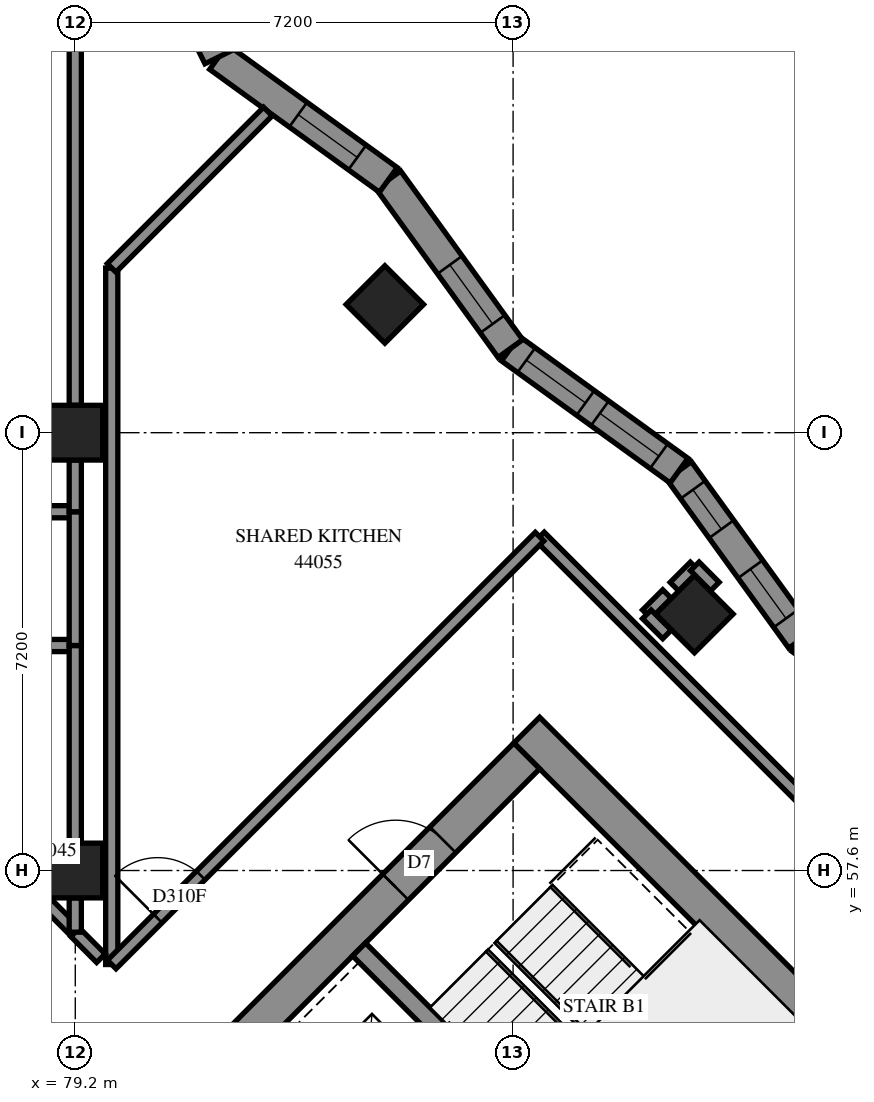
"""IFC4 building model, lengths in metres.
Left out: names, types, materials, properties, quantities, classifications, styles, units other than length and angle.
Written with IfcOpenShell. Run it as: python <this file> out.ifc"""

import sys

from ifc_helpers import new_model, si_unit, direction, frame, frame_2d, origin, origin_2d, place, context, subcontext, project, spatial, polyline, rectangle, outline, extrude, element, fill, save


model = new_model("IFC4")
c1 = context("Model", 3, precision=1e-05, world=origin(), true_north=direction((0.0, 1.0)))
c2 = subcontext(c1, "Body", "Model", "MODEL_VIEW")
j1 = project(units=[si_unit("LENGTHUNIT", "METRE"), si_unit("PLANEANGLEUNIT", "RADIAN")], contexts=[c1])
p1 = place(None, origin())
s1 = spatial("IfcSite", under=j1, at=p1, CompositionType="ELEMENT")
p2 = place(p1, origin())
s2 = spatial("IfcBuilding", under=s1, at=p2, CompositionType="ELEMENT")
p3 = place(p2, frame((0.0, 0.0, 162.6)))
s3 = spatial("IfcBuildingStorey", under=s2, at=p3, CompositionType="ELEMENT", Elevation=162.6)
for number, where, z_axis, x_axis in (
    (1, (79.2, 57.6, 0.0), (0.0, 0.0, 1.0), (1.0, 0.0, 0.0)),
    (2, (79.2, 64.8, 0.0), (0.0, 0.0, 1.0), (1.0, 0.0, 0.0)),
    (3, (84.291, 66.909, 0.0), (0.0, 0.0, 1.0), (0.707, -0.707, 0.0)),
    (4, (89.382, 61.818, 0.0), (0.0, 0.0, 1.0), (0.707, -0.707, 0.0)),
):
    element("IfcColumn", number, at=place(p3, frame(where, z_axis=z_axis, x_axis=x_axis)), inside=s3, PredefinedType="COLUMN", context=c2, shape_type="SweptSolid", body=[
        extrude(rectangle(XDim=0.9, YDim=0.9, at=origin_2d()), origin(), (0.0, 0.0, 1.0), 3.1),
    ])
p4 = place(p3, frame((86.625, 59.908, -0.3), z_axis=(0.0, 0.0, 1.0), x_axis=(0.7071067812, -0.7071067812, 0.0)))
e5 = element("IfcWall", 5, at=p4, inside=s3, PredefinedType="SHEAR", context=c2, shape_type="SweptSolid", body=[
    extrude(rectangle(XDim=15.6, YDim=0.6, at=frame_2d((7.8, 0.0))), origin(), (0.0, 0.0, 1.0), 2.7),
])
p5 = place(p4, frame((10.6, 0.0, 0.3)))
e6 = element("IfcOpeningElement", 6, at=p5, cuts=e5, PredefinedType="OPENING", context=c2, shape_type="SweptSolid", body=[
    extrude(rectangle(XDim=0.8, YDim=2.1, at=frame_2d((0.4, 1.05))), frame((0.0, 0.31, 0.0), z_axis=(0.0, -1.0, 0.0), x_axis=(1.0, 0.0, 0.0)), (0.0, 0.0, 1.0), 0.62),
])
p6 = place(p3, frame((76.442, 49.302, -0.3), z_axis=(0.0, 0.0, 1.0), x_axis=(0.7071067812, 0.7071067812, 0.0)))
e7 = element("IfcWall", 7, at=p6, inside=s3, PredefinedType="SHEAR", context=c2, shape_type="SweptSolid", body=[
    extrude(rectangle(XDim=14.4, YDim=0.6, at=frame_2d((7.2, 0.0))), origin(), (0.0, 0.0, 1.0), 2.7),
])
p7 = place(p6, frame((4.55, 0.0, 0.3)))
e8 = element("IfcOpeningElement", 8, at=p7, cuts=e7, PredefinedType="OPENING", context=c2, shape_type="SweptSolid", body=[
    extrude(rectangle(XDim=1.1, YDim=2.1, at=frame_2d((0.55, 1.05))), frame((0.0, 0.31, 0.0), z_axis=(0.0, -1.0, 0.0), x_axis=(1.0, 0.0, 0.0)), (0.0, 0.0, 1.0), 0.62),
])
p8 = place(p6, frame((11.35, 0.0, 0.3)))
e9 = element("IfcOpeningElement", 9, at=p8, cuts=e7, PredefinedType="OPENING", context=c2, shape_type="SweptSolid", body=[
    extrude(rectangle(XDim=1.1, YDim=2.1, at=frame_2d((0.55, 1.05))), frame((0.0, 0.31, 0.0), z_axis=(0.0, -1.0, 0.0), x_axis=(1.0, 0.0, 0.0)), (0.0, 0.0, 1.0), 0.62),
])
p9 = place(p3, frame((83.867, 56.302, 0.0), z_axis=(0.0, 0.0, 1.0), x_axis=(0.7071137256, -0.7070998367, 0.0)))
e10 = element("IfcWall", 10, at=p9, inside=s3, PredefinedType="SOLIDWALL", context=c2, shape_type="SweptSolid", body=[
    extrude(rectangle(XDim=7.2, YDim=0.3, at=frame_2d((3.6, 0.0))), origin(), (0.0, 0.0, 1.0), 3.1),
])
p10 = place(p3, frame((93.91, 59.395, 0.0), z_axis=(0.0, 0.0, 1.0), x_axis=(-0.8101104885, 0.5862772351, 0.0)))
e11 = element("IfcWall", 11, at=p10, inside=s3, PredefinedType="SOLIDWALL", context=c2, shape_type="SweptSolid", body=[
    extrude(outline(polyline([(-0.04, -0.25), (3.384, -0.25), (3.464, 0.25), (0.04, 0.25), (-0.04, -0.25)])), origin(), (0.0, 0.0, 1.0), 3.1),
])
p11 = place(p10, frame((1.678, 0.0, 0.45)))
e12 = element("IfcOpeningElement", 12, at=p11, cuts=e11, PredefinedType="OPENING", context=c2, shape_type="SweptSolid", body=[
    extrude(rectangle(XDim=1.2, YDim=2.5, at=frame_2d((0.6, 1.25))), frame((0.0, 0.26, 0.0), z_axis=(0.0, -1.0, 0.0), x_axis=(1.0, 0.0, 0.0)), (0.0, 0.0, 1.0), 0.52),
])
p12 = place(p3, frame((91.137, 61.402, 0.0), z_axis=(0.0, 0.0, 1.0), x_axis=(-0.5862772351, 0.8101104885, 0.0)))
e13 = element("IfcWall", 13, at=p12, inside=s3, PredefinedType="SOLIDWALL", context=c2, shape_type="SweptSolid", body=[
    extrude(outline(polyline([(0.04, -0.25), (3.464, -0.25), (3.384, 0.25), (-0.04, 0.25), (0.04, -0.25)])), origin(), (0.0, 0.0, 1.0), 3.1),
])
p13 = place(p12, frame((0.423, 0.0, 0.45)))
e14 = element("IfcOpeningElement", 14, at=p13, cuts=e13, PredefinedType="OPENING", context=c2, shape_type="SweptSolid", body=[
    extrude(rectangle(XDim=1.0, YDim=2.5, at=frame_2d((0.5, 1.25))), frame((0.0, 0.26, 0.0), z_axis=(0.0, -1.0, 0.0), x_axis=(1.0, 0.0, 0.0)), (0.0, 0.0, 1.0), 0.52),
])
p14 = place(p12, frame((2.236, 0.0, 0.45)))
e15 = element("IfcOpeningElement", 15, at=p14, cuts=e13, PredefinedType="OPENING", context=c2, shape_type="SweptSolid", body=[
    extrude(rectangle(XDim=0.8, YDim=2.5, at=frame_2d((0.4, 1.25))), frame((0.0, 0.26, 0.0), z_axis=(0.0, -1.0, 0.0), x_axis=(1.0, 0.0, 0.0)), (0.0, 0.0, 1.0), 0.52),
])
p15 = place(p3, frame((89.129, 64.176, 0.0), z_axis=(0.0, 0.0, 1.0), x_axis=(-0.8101205268, 0.586263364, 0.0)))
e16 = element("IfcWall", 16, at=p15, inside=s3, PredefinedType="SOLIDWALL", context=c2, shape_type="SweptSolid", body=[
    extrude(outline(polyline([(-0.04, -0.25), (3.384, -0.25), (3.464, 0.25), (0.04, 0.25), (-0.04, -0.25)])), origin(), (0.0, 0.0, 1.0), 3.1),
])
p16 = place(p15, frame((0.408, 0.0, 0.45)))
e17 = element("IfcOpeningElement", 17, at=p16, cuts=e16, PredefinedType="OPENING", context=c2, shape_type="SweptSolid", body=[
    extrude(rectangle(XDim=1.2, YDim=2.5, at=frame_2d((0.6, 1.25))), frame((0.0, 0.26, 0.0), z_axis=(0.0, -1.0, 0.0), x_axis=(1.0, 0.0, 0.0)), (0.0, 0.0, 1.0), 0.52),
])
p17 = place(p15, frame((1.9, 0.0, 0.45)))
e18 = element("IfcOpeningElement", 18, at=p17, cuts=e16, PredefinedType="OPENING", context=c2, shape_type="SweptSolid", body=[
    extrude(rectangle(XDim=1.2, YDim=2.5, at=frame_2d((0.6, 1.25))), frame((0.0, 0.26, 0.0), z_axis=(0.0, -1.0, 0.0), x_axis=(1.0, 0.0, 0.0)), (0.0, 0.0, 1.0), 0.52),
])
p18 = place(p3, frame((86.355, 66.184, 0.0), z_axis=(0.0, 0.0, 1.0), x_axis=(-0.5862441964, 0.8101343976, 0.0)))
e19 = element("IfcWall", 19, at=p18, inside=s3, PredefinedType="SOLIDWALL", context=c2, shape_type="SweptSolid", body=[
    extrude(outline(polyline([(0.04, -0.25), (3.464, -0.25), (3.384, 0.25), (-0.04, 0.25), (0.04, -0.25)])), origin(), (0.0, 0.0, 1.0), 3.1),
])
p19 = place(p18, frame((0.499, 0.0, 0.45)))
e20 = element("IfcOpeningElement", 20, at=p19, cuts=e19, PredefinedType="OPENING", context=c2, shape_type="SweptSolid", body=[
    extrude(rectangle(XDim=1.2, YDim=2.5, at=frame_2d((0.6, 1.25))), frame((0.0, 0.26, 0.0), z_axis=(0.0, -1.0, 0.0), x_axis=(1.0, 0.0, 0.0)), (0.0, 0.0, 1.0), 0.52),
])
p20 = place(p3, frame((84.348, 68.957, 0.0), z_axis=(0.0, 0.0, 1.0), x_axis=(-0.8101255807, 0.5862563803, 0.0)))
e21 = element("IfcWall", 21, at=p20, inside=s3, PredefinedType="SOLIDWALL", context=c2, shape_type="SweptSolid", body=[
    extrude(outline(polyline([(-0.04, -0.25), (3.384, -0.25), (3.507, 0.25), (0.04, 0.25), (-0.04, -0.25)])), origin(), (0.0, 0.0, 1.0), 3.1),
])
p21 = place(p20, frame((0.63, 0.0, 0.45)))
e22 = element("IfcOpeningElement", 22, at=p21, cuts=e21, PredefinedType="OPENING", context=c2, shape_type="SweptSolid", body=[
    extrude(rectangle(XDim=1.2, YDim=2.5, at=frame_2d((0.6, 1.25))), frame((0.0, 0.26, 0.0), z_axis=(0.0, -1.0, 0.0), x_axis=(1.0, 0.0, 0.0)), (0.0, 0.0, 1.0), 0.52),
])
p22 = place(p3, frame((81.557, 70.978, 0.0), z_axis=(0.0, 0.0, 1.0), x_axis=(-0.4436419496, 0.8962041177, 0.0)))
e23 = element("IfcWall", 23, at=p22, inside=s3, PredefinedType="SOLIDWALL", context=c2, shape_type="SweptSolid", body=[
    extrude(outline(polyline([(0.062, -0.25), (3.63, -0.25), (3.208, 0.25), (-0.062, 0.25), (0.062, -0.25)])), origin(), (0.0, 0.0, 1.0), 3.1),
])
p23 = place(p22, frame((0.761, 0.0, 0.45)))
e24 = element("IfcOpeningElement", 24, at=p23, cuts=e23, PredefinedType="OPENING", context=c2, shape_type="SweptSolid", body=[
    extrude(rectangle(XDim=1.2, YDim=2.5, at=frame_2d((0.6, 1.25))), frame((0.0, 0.26, 0.0), z_axis=(0.0, -1.0, 0.0), x_axis=(1.0, 0.0, 0.0)), (0.0, 0.0, 1.0), 0.52),
])
p24 = place(p3, frame((86.841, 63.093, 0.0), z_axis=(0.0, 0.0, 1.0), x_axis=(0.7071067812, -0.7071067812, 0.0)))
e25 = element("IfcWall", 25, at=p24, inside=s3, PredefinedType="PARTITIONING", context=c2, shape_type="SweptSolid", body=[
    extrude(rectangle(XDim=12.239, YDim=0.2, at=frame_2d((6.119, 0.0))), origin(), (0.0, 0.0, 1.0), 3.1),
])
p25 = place(p3, frame((79.8, 56.054, 0.0), z_axis=(0.0, 0.0, 1.0), x_axis=(0.0, 1.0, 0.0)))
e26 = element("IfcWall", 26, at=p25, inside=s3, PredefinedType="PARTITIONING", context=c2, shape_type="SweptSolid", body=[
    extrude(rectangle(XDim=11.454, YDim=0.2, at=frame_2d((5.727, 0.0))), origin(), (0.0, 0.0, 1.0), 3.1),
])
p26 = place(p3, frame((79.799, 56.055, 0.0), z_axis=(0.0, 0.0, 1.0), x_axis=(0.7071067812, 0.7071067812, 0.0)))
e27 = element("IfcWall", 27, at=p26, inside=s3, PredefinedType="PARTITIONING", context=c2, shape_type="SweptSolid", body=[
    extrude(rectangle(XDim=9.95, YDim=0.2, at=frame_2d((4.975, 0.0))), origin(), (0.0, 0.0, 1.0), 3.1),
])
p27 = place(p26, frame((1.071, 0.0, 0.0)))
e28 = element("IfcOpeningElement", 28, at=p27, cuts=e27, PredefinedType="OPENING", context=c2, shape_type="SweptSolid", body=[
    extrude(rectangle(XDim=1.0, YDim=2.1, at=frame_2d((0.5, 1.05))), frame((0.0, 0.11, 0.0), z_axis=(0.0, -1.0, 0.0), x_axis=(1.0, 0.0, 0.0)), (0.0, 0.0, 1.0), 0.22),
])
p28 = place(p3, frame((79.2, 65.25, 0.0), z_axis=(0.0, 0.0, 1.0), x_axis=(0.0, 1.0, 0.0)))
e29 = element("IfcWall", 29, at=p28, inside=s3, PredefinedType="PARTITIONING", context=c2, shape_type="SweptSolid", body=[
    extrude(rectangle(XDim=6.3, YDim=0.2, at=frame_2d((3.15, 0.0))), origin(), (0.0, 0.0, 1.0), 3.1),
])
p29 = place(p3, frame((74.903, 60.889, 0.0), z_axis=(0.0, 0.0, 1.0), x_axis=(0.7071067812, -0.7071067812, 0.0)))
e30 = element("IfcWall", 30, at=p29, inside=s3, PredefinedType="PARTITIONING", context=c2, shape_type="SweptSolid", body=[
    extrude(rectangle(XDim=6.081, YDim=0.2, at=frame_2d((3.041, 0.0))), origin(), (0.0, 0.0, 1.0), 3.1),
])
p30 = place(p3, frame((74.488, 61.3, 0.0), z_axis=(0.0, 0.0, 1.0), x_axis=(1.0, 0.0, 0.0)))
e31 = element("IfcWall", 31, at=p30, inside=s3, PredefinedType="PARTITIONING", context=c2, shape_type="SweptSolid", body=[
    extrude(rectangle(XDim=4.712, YDim=0.2, at=frame_2d((2.356, 0.0))), origin(), (0.0, 0.0, 1.0), 3.1),
])
p31 = place(p30, frame((1.037, 0.0, 0.0)))
e32 = element("IfcOpeningElement", 32, at=p31, cuts=e31, PredefinedType="OPENING", context=c2, shape_type="SweptSolid", body=[
    extrude(rectangle(XDim=1.0, YDim=2.1, at=frame_2d((0.5, 1.05))), frame((0.0, 0.11, 0.0), z_axis=(0.0, -1.0, 0.0), x_axis=(1.0, 0.0, 0.0)), (0.0, 0.0, 1.0), 0.22),
])
p32 = place(p3, frame((74.702, 63.5, 0.0), z_axis=(0.0, 0.0, 1.0), x_axis=(1.0, 0.0, 0.0)))
e33 = element("IfcWall", 33, at=p32, inside=s3, PredefinedType="PARTITIONING", context=c2, shape_type="SweptSolid", body=[
    extrude(rectangle(XDim=4.498, YDim=0.2, at=frame_2d((2.249, 0.0))), origin(), (0.0, 0.0, 1.0), 3.1),
])
p33 = place(p32, frame((3.046, 0.0, 0.0)))
e34 = element("IfcOpeningElement", 34, at=p33, cuts=e33, PredefinedType="OPENING", context=c2, shape_type="SweptSolid", body=[
    extrude(rectangle(XDim=0.9, YDim=2.1, at=frame_2d((0.45, 1.05))), frame((0.0, 0.11, 0.0), z_axis=(0.0, -1.0, 0.0), x_axis=(1.0, 0.0, 0.0)), (0.0, 0.0, 1.0), 0.22),
])
p34 = place(p3, frame((79.798, 67.51, 0.0), z_axis=(0.0, 0.0, 1.0), x_axis=(0.7068316745, 0.7073817809, 0.0)))
e35 = element("IfcWall", 35, at=p34, inside=s3, PredefinedType="PARTITIONING", context=c2, shape_type="SweptSolid", body=[
    extrude(rectangle(XDim=3.636, YDim=0.2, at=frame_2d((1.818, 0.0))), origin(), (0.0, 0.0, 1.0), 3.1),
])
p35 = place(p3, frame((79.2, 58.05, 0.0), z_axis=(0.0, 0.0, 1.0), x_axis=(0.0, 1.0, 0.0)))
e36 = element("IfcWall", 36, at=p35, inside=s3, PredefinedType="PARTITIONING", context=c2, shape_type="SweptSolid", body=[
    extrude(rectangle(XDim=3.25, YDim=0.2, at=frame_2d((1.625, 0.0))), origin(), (0.0, 0.0, 1.0), 3.1),
])
p36 = place(p3, frame((79.2, 61.3, 0.0), z_axis=(0.0, 0.0, 1.0), x_axis=(0.0, 1.0, 0.0)))
e37 = element("IfcWall", 37, at=p36, inside=s3, PredefinedType="PARTITIONING", context=c2, shape_type="SweptSolid", body=[
    extrude(rectangle(XDim=2.2, YDim=0.2, at=frame_2d((1.1, 0.0))), origin(), (0.0, 0.0, 1.0), 3.1),
])
p37 = place(p3, frame((79.2, 63.5, 0.0), z_axis=(0.0, 0.0, 1.0), x_axis=(0.0, 1.0, 0.0)))
e38 = element("IfcWall", 38, at=p37, inside=s3, PredefinedType="PARTITIONING", context=c2, shape_type="SweptSolid", body=[
    extrude(rectangle(XDim=0.85, YDim=0.2, at=frame_2d((0.425, 0.0))), origin(), (0.0, 0.0, 1.0), 3.1),
])
p38 = place(p3, frame((79.198, 56.584, 0.0), z_axis=(0.0, 0.0, 1.0), x_axis=(0.7054410477, -0.7087685999, 0.0)))
e39 = element("IfcWall", 39, at=p38, inside=s3, PredefinedType="PARTITIONING", context=c2, shape_type="SweptSolid", body=[
    extrude(rectangle(XDim=0.601, YDim=0.2, at=frame_2d((0.3, 0.0))), origin(), (0.0, 0.0, 1.0), 3.1),
])
p39 = place(p3, frame((79.2, 56.586, 0.0), z_axis=(0.0, 0.0, 1.0), x_axis=(0.0, 1.0, 0.0)))
e40 = element("IfcWall", 40, at=p39, inside=s3, PredefinedType="PARTITIONING", context=c2, shape_type="SweptSolid", body=[
    extrude(rectangle(XDim=0.564, YDim=0.2, at=frame_2d((0.282, 0.0))), origin(), (0.0, 0.0, 1.0), 3.1),
])
for number, where, z_axis, x_axis in (
    (41, (88.6, 61.814, 0.0), (0.0, 0.0, 1.0), (0.707, 0.707, 0.0)),
    (42, (89.054, 62.268, 0.0), (0.0, 0.0, 1.0), (0.707, 0.707, 0.0)),
):
    element("IfcWall", number, at=place(p3, frame(where, z_axis=z_axis, x_axis=x_axis)), inside=s3, PredefinedType="PARTITIONING", context=c2, shape_type="SweptSolid", body=[
        extrude(rectangle(XDim=0.469, YDim=0.2, at=frame_2d((0.235, 0.0))), origin(), (0.0, 0.0, 1.0), 3.1),
    ])
for number, where, z_axis, x_axis in (
    (43, (88.599, 61.813, 0.0), (0.0, 0.0, 1.0), (0.709, -0.705, 0.0)),
    (44, (89.388, 62.602, 0.0), (0.0, 0.0, 1.0), (0.705, -0.709, 0.0)),
):
    element("IfcWall", number, at=place(p3, frame(where, z_axis=z_axis, x_axis=x_axis)), inside=s3, PredefinedType="PARTITIONING", context=c2, shape_type="SweptSolid", body=[
        extrude(rectangle(XDim=0.468, YDim=0.2, at=frame_2d((0.234, 0.0))), origin(), (0.0, 0.0, 1.0), 3.1),
    ])
p40 = place(p16, origin())
e45 = element("IfcWindow", 45, at=p40, inside=s3, PartitioningType="SINGLE_PANEL", PredefinedType="WINDOW", context=c2, shape_type="SweptSolid", body=[
    extrude(rectangle(XDim=1.2, YDim=2.5, at=frame_2d((0.6, 1.25))), frame((0.0, 0.18, 0.0), z_axis=(0.0, -1.0, 0.0), x_axis=(1.0, 0.0, 0.0)), (0.0, 0.0, 1.0), 0.06),
])
fill(e17, e45)
p41 = place(p17, origin())
e46 = element("IfcWindow", 46, at=p41, inside=s3, PartitioningType="SINGLE_PANEL", PredefinedType="WINDOW", context=c2, shape_type="SweptSolid", body=[
    extrude(rectangle(XDim=1.2, YDim=2.5, at=frame_2d((0.6, 1.25))), frame((0.0, 0.18, 0.0), z_axis=(0.0, -1.0, 0.0), x_axis=(1.0, 0.0, 0.0)), (0.0, 0.0, 1.0), 0.06),
])
fill(e18, e46)
p42 = place(p19, origin())
e47 = element("IfcWindow", 47, at=p42, inside=s3, PartitioningType="SINGLE_PANEL", PredefinedType="WINDOW", context=c2, shape_type="SweptSolid", body=[
    extrude(rectangle(XDim=1.2, YDim=2.5, at=frame_2d((0.6, 1.25))), frame((0.0, 0.18, 0.0), z_axis=(0.0, -1.0, 0.0), x_axis=(1.0, 0.0, 0.0)), (0.0, 0.0, 1.0), 0.06),
])
fill(e20, e47)
p43 = place(p21, origin())
e48 = element("IfcWindow", 48, at=p43, inside=s3, PartitioningType="SINGLE_PANEL", PredefinedType="WINDOW", context=c2, shape_type="SweptSolid", body=[
    extrude(rectangle(XDim=1.2, YDim=2.5, at=frame_2d((0.6, 1.25))), frame((0.0, 0.18, 0.0), z_axis=(0.0, -1.0, 0.0), x_axis=(1.0, 0.0, 0.0)), (0.0, 0.0, 1.0), 0.06),
])
fill(e22, e48)
p44 = place(p8, origin())
e49 = element("IfcDoor", 49, at=p44, inside=s3, OperationType="SINGLE_SWING_LEFT", PredefinedType="DOOR", context=c2, shape_type="SweptSolid", body=[
    extrude(rectangle(XDim=1.1, YDim=2.1, at=frame_2d((0.55, 1.05))), frame((0.0, 0.025, 0.0), z_axis=(0.0, -1.0, 0.0), x_axis=(1.0, 0.0, 0.0)), (0.0, 0.0, 1.0), 0.05),
])
fill(e9, e49)
p45 = place(p27, origin())
e50 = element("IfcDoor", 50, at=p45, inside=s3, OperationType="SINGLE_SWING_RIGHT", PredefinedType="DOOR", context=c2, shape_type="SweptSolid", body=[
    extrude(rectangle(XDim=1.0, YDim=2.1, at=frame_2d((0.5, 1.05))), frame((0.0, 0.025, 0.0), z_axis=(0.0, -1.0, 0.0), x_axis=(1.0, 0.0, 0.0)), (0.0, 0.0, 1.0), 0.05),
])
fill(e28, e50)
p46 = place(p13, origin())
e51 = element("IfcWindow", 51, at=p46, inside=s3, PartitioningType="SINGLE_PANEL", PredefinedType="WINDOW", context=c2, shape_type="SweptSolid", body=[
    extrude(rectangle(XDim=1.0, YDim=2.5, at=frame_2d((0.5, 1.25))), frame((0.0, 0.18, 0.0), z_axis=(0.0, -1.0, 0.0), x_axis=(1.0, 0.0, 0.0)), (0.0, 0.0, 1.0), 0.06),
])
fill(e14, e51)
p47 = place(p14, origin())
e52 = element("IfcWindow", 52, at=p47, inside=s3, PartitioningType="SINGLE_PANEL", PredefinedType="WINDOW", context=c2, shape_type="SweptSolid", body=[
    extrude(rectangle(XDim=0.8, YDim=2.5, at=frame_2d((0.4, 1.25))), frame((0.0, 0.18, 0.0), z_axis=(0.0, -1.0, 0.0), x_axis=(1.0, 0.0, 0.0)), (0.0, 0.0, 1.0), 0.06),
])
fill(e15, e52)
save(model, sys.argv[1])
